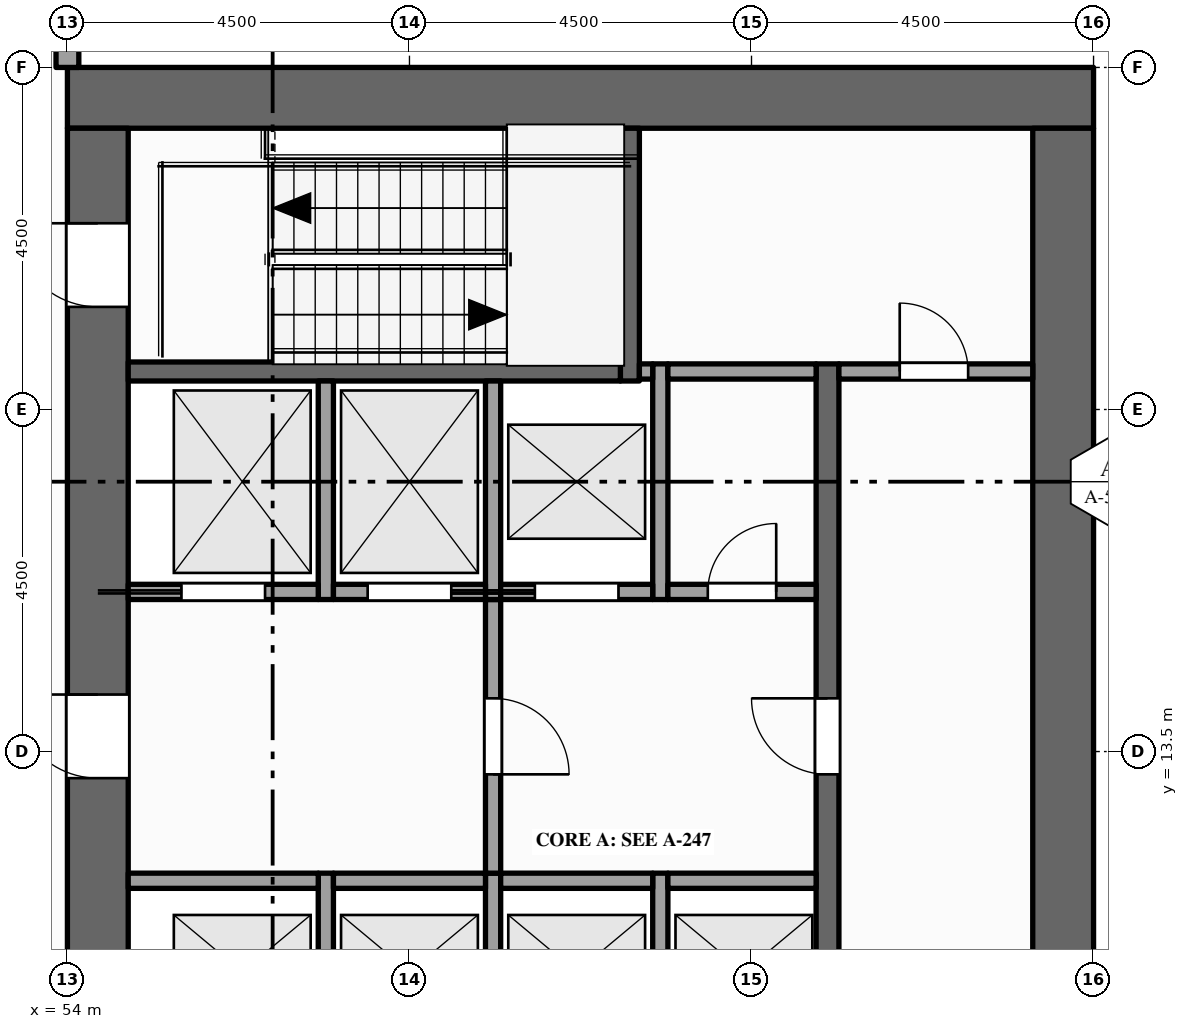
"""IFC4 building model, lengths in metres.
Left out: names, types, materials, properties, quantities, classifications, styles, units other than length and angle.
Written with IfcOpenShell. Run it as: python <this file> out.ifc"""

import sys

from ifc_helpers import new_model, si_unit, direction, frame, frame_2d, origin, place, context, subcontext, project, spatial, rectangle, extrude, element, fill, save


model = new_model("IFC4")
c1 = context("Model", 3, precision=1e-05, world=origin(), true_north=direction((0.0, 1.0)))
c2 = subcontext(c1, "Body", "Model", "MODEL_VIEW")
j1 = project(units=[si_unit("LENGTHUNIT", "METRE"), si_unit("PLANEANGLEUNIT", "RADIAN")], contexts=[c1])
p1 = place(None, origin())
s1 = spatial("IfcSite", under=j1, at=p1, CompositionType="ELEMENT")
p2 = place(p1, origin())
s2 = spatial("IfcBuilding", under=s1, at=p2, CompositionType="ELEMENT")
p3 = place(p2, frame((0.0, 0.0, 269.0)))
s3 = spatial("IfcBuildingStorey", under=s2, at=p3, CompositionType="ELEMENT", Elevation=269.0)
p4 = place(p3, frame((54.0, 22.1, -0.15), z_axis=(0.0, 0.0, 1.0), x_axis=(1.0, 0.0, 0.0)))
e1 = element("IfcWall", 1, at=p4, inside=s3, PredefinedType="SHEAR", context=c2, shape_type="SweptSolid", body=[
    extrude(rectangle(XDim=13.5, YDim=0.8, at=frame_2d((6.75, 0.0))), origin(), (0.0, 0.0, 1.0), 4.0),
])
p5 = place(p3, frame((54.4, 0.8, -0.15), z_axis=(0.0, 0.0, 1.0), x_axis=(0.0, 1.0, 0.0)))
e2 = element("IfcWall", 2, at=p5, inside=s3, PredefinedType="SHEAR", context=c2, shape_type="SweptSolid", body=[
    extrude(rectangle(XDim=20.9, YDim=0.8, at=frame_2d((10.45, 0.0))), origin(), (0.0, 0.0, 1.0), 4.0),
])
p6 = place(p5, frame((6.3, 0.0, 0.15)))
e3 = element("IfcOpeningElement", 3, at=p6, cuts=e2, PredefinedType="OPENING", context=c2, shape_type="SweptSolid", body=[
    extrude(rectangle(XDim=1.8, YDim=2.1, at=frame_2d((0.9, 1.05))), frame((0.0, 0.41, 0.0), z_axis=(0.0, -1.0, 0.0), x_axis=(1.0, 0.0, 0.0)), (0.0, 0.0, 1.0), 0.82),
])
p7 = place(p5, frame((12.35, 0.0, 0.15)))
e4 = element("IfcOpeningElement", 4, at=p7, cuts=e2, PredefinedType="OPENING", context=c2, shape_type="SweptSolid", body=[
    extrude(rectangle(XDim=1.1, YDim=2.1, at=frame_2d((0.55, 1.05))), frame((0.0, 0.41, 0.0), z_axis=(0.0, -1.0, 0.0), x_axis=(1.0, 0.0, 0.0)), (0.0, 0.0, 1.0), 0.82),
])
p8 = place(p5, frame((1.35, 0.0, 0.15)))
e5 = element("IfcOpeningElement", 5, at=p8, cuts=e2, PredefinedType="OPENING", context=c2, shape_type="SweptSolid", body=[
    extrude(rectangle(XDim=1.1, YDim=2.1, at=frame_2d((0.55, 1.05))), frame((0.0, 0.41, 0.0), z_axis=(0.0, -1.0, 0.0), x_axis=(1.0, 0.0, 0.0)), (0.0, 0.0, 1.0), 0.82),
])
p9 = place(p5, frame((18.55, 0.0, 0.15)))
e6 = element("IfcOpeningElement", 6, at=p9, cuts=e2, PredefinedType="OPENING", context=c2, shape_type="SweptSolid", body=[
    extrude(rectangle(XDim=1.1, YDim=2.1, at=frame_2d((0.55, 1.05))), frame((0.0, 0.41, 0.0), z_axis=(0.0, -1.0, 0.0), x_axis=(1.0, 0.0, 0.0)), (0.0, 0.0, 1.0), 0.82),
])
p10 = place(p3, frame((67.1, 0.8, -0.15), z_axis=(0.0, 0.0, 1.0), x_axis=(0.0, 1.0, 0.0)))
e7 = element("IfcWall", 7, at=p10, inside=s3, PredefinedType="SHEAR", context=c2, shape_type="SweptSolid", body=[
    extrude(rectangle(XDim=20.9, YDim=0.8, at=frame_2d((10.45, 0.0))), origin(), (0.0, 0.0, 1.0), 4.0),
])
p11 = place(p3, frame((54.0, 22.5, 0.0), z_axis=(0.0, 0.0, 1.0), x_axis=(0.0, 1.0, 0.0)))
e8 = element("IfcWall", 8, at=p11, inside=s3, PredefinedType="STANDARD", context=c2, shape_type="SweptSolid", body=[
    extrude(rectangle(XDim=1.175, YDim=0.3, at=frame_2d((0.587, 0.0))), origin(), (0.0, 0.0, 1.0), 3.162),
])
p12 = place(p3, frame((57.4, 9.3, 0.0), z_axis=(0.0, 0.0, 1.0), x_axis=(0.0, 1.0, 0.0)))
e9 = element("IfcWall", 9, at=p12, inside=s3, PredefinedType="SOLIDWALL", context=c2, shape_type="SweptSolid", body=[
    extrude(rectangle(XDim=2.6, YDim=0.2, at=frame_2d((1.3, 0.0))), origin(), (0.0, 0.0, 1.0), 3.85),
])
p13 = place(p3, frame((57.4, 15.5, 0.0), z_axis=(0.0, 0.0, 1.0), x_axis=(0.0, 1.0, 0.0)))
e10 = element("IfcWall", 10, at=p13, inside=s3, PredefinedType="SOLIDWALL", context=c2, shape_type="SweptSolid", body=[
    extrude(rectangle(XDim=2.875, YDim=0.2, at=frame_2d((1.438, 0.0))), origin(), (0.0, 0.0, 1.0), 3.85),
])
p14 = place(p3, frame((59.6, 9.3, 0.0), z_axis=(0.0, 0.0, 1.0), x_axis=(0.0, 1.0, 0.0)))
e11 = element("IfcWall", 11, at=p14, inside=s3, PredefinedType="SOLIDWALL", context=c2, shape_type="SweptSolid", body=[
    extrude(rectangle(XDim=2.6, YDim=0.2, at=frame_2d((1.3, 0.0))), origin(), (0.0, 0.0, 1.0), 3.85),
])
p15 = place(p3, frame((59.6, 11.9, 0.0), z_axis=(0.0, 0.0, 1.0), x_axis=(0.0, 1.0, 0.0)))
e12 = element("IfcWall", 12, at=p15, inside=s3, PredefinedType="PARTITIONING", context=c2, shape_type="SweptSolid", body=[
    extrude(rectangle(XDim=3.6, YDim=0.2, at=frame_2d((1.8, 0.0))), origin(), (0.0, 0.0, 1.0), 3.85),
])
p16 = place(p15, frame((1.3, 0.0, 0.0)))
e13 = element("IfcOpeningElement", 13, at=p16, cuts=e12, PredefinedType="OPENING", context=c2, shape_type="SweptSolid", body=[
    extrude(rectangle(XDim=1.0, YDim=2.1, at=frame_2d((0.5, 1.05))), frame((0.0, 0.11, 0.0), z_axis=(0.0, -1.0, 0.0), x_axis=(1.0, 0.0, 0.0)), (0.0, 0.0, 1.0), 0.22),
])
p17 = place(p3, frame((59.6, 15.5, 0.0), z_axis=(0.0, 0.0, 1.0), x_axis=(0.0, 1.0, 0.0)))
e14 = element("IfcWall", 14, at=p17, inside=s3, PredefinedType="SOLIDWALL", context=c2, shape_type="SweptSolid", body=[
    extrude(rectangle(XDim=2.875, YDim=0.2, at=frame_2d((1.438, 0.0))), origin(), (0.0, 0.0, 1.0), 3.85),
])
p18 = place(p3, frame((61.4, 18.375, 0.0), z_axis=(0.0, 0.0, 1.0), x_axis=(0.0, 1.0, 0.0)))
e15 = element("IfcWall", 15, at=p18, inside=s3, PredefinedType="SHEAR", context=c2, shape_type="SweptSolid", body=[
    extrude(rectangle(XDim=3.325, YDim=0.25, at=frame_2d((1.663, 0.0))), origin(), (0.0, 0.0, 1.0), 3.85),
])
p19 = place(p3, frame((61.8, 9.3, 0.0), z_axis=(0.0, 0.0, 1.0), x_axis=(0.0, 1.0, 0.0)))
e16 = element("IfcWall", 16, at=p19, inside=s3, PredefinedType="SOLIDWALL", context=c2, shape_type="SweptSolid", body=[
    extrude(rectangle(XDim=2.6, YDim=0.2, at=frame_2d((1.3, 0.0))), origin(), (0.0, 0.0, 1.0), 3.85),
])
p20 = place(p3, frame((61.8, 15.5, 0.0), z_axis=(0.0, 0.0, 1.0), x_axis=(0.0, 1.0, 0.0)))
e17 = element("IfcWall", 17, at=p20, inside=s3, PredefinedType="SOLIDWALL", context=c2, shape_type="SweptSolid", body=[
    extrude(rectangle(XDim=3.1, YDim=0.2, at=frame_2d((1.55, 0.0))), origin(), (0.0, 0.0, 1.0), 3.85),
])
p21 = place(p3, frame((64.0, 4.1, 0.0), z_axis=(0.0, 0.0, 1.0), x_axis=(0.0, 1.0, 0.0)))
e18 = element("IfcWall", 18, at=p21, inside=s3, PredefinedType="SHEAR", context=c2, shape_type="SweptSolid", body=[
    extrude(rectangle(XDim=14.5, YDim=0.3, at=frame_2d((7.25, 0.0))), origin(), (0.0, 0.0, 1.0), 3.85),
])
p22 = place(p21, frame((3.4, 0.0, 0.0)))
e19 = element("IfcOpeningElement", 19, at=p22, cuts=e18, PredefinedType="OPENING", context=c2, shape_type="SweptSolid", body=[
    extrude(rectangle(XDim=1.0, YDim=2.1, at=frame_2d((0.5, 1.05))), frame((0.0, 0.16, 0.0), z_axis=(0.0, -1.0, 0.0), x_axis=(1.0, 0.0, 0.0)), (0.0, 0.0, 1.0), 0.32),
])
p23 = place(p21, frame((9.1, 0.0, 0.0)))
e20 = element("IfcOpeningElement", 20, at=p23, cuts=e18, PredefinedType="OPENING", context=c2, shape_type="SweptSolid", body=[
    extrude(rectangle(XDim=1.0, YDim=2.1, at=frame_2d((0.5, 1.05))), frame((0.0, 0.16, 0.0), z_axis=(0.0, -1.0, 0.0), x_axis=(1.0, 0.0, 0.0)), (0.0, 0.0, 1.0), 0.32),
])
p24 = place(p3, frame((54.8, 11.8, 0.0), z_axis=(0.0, 0.0, 1.0), x_axis=(1.0, 0.0, 0.0)))
e21 = element("IfcWall", 21, at=p24, inside=s3, PredefinedType="SOLIDWALL", context=c2, shape_type="SweptSolid", body=[
    extrude(rectangle(XDim=2.5, YDim=0.2, at=frame_2d((1.25, 0.0))), origin(), (0.0, 0.0, 1.0), 3.85),
])
for number, where, z_axis, x_axis in (
    (22, (57.5, 11.8, 0.0), (0.0, 0.0, 1.0), (1.0, 0.0, 0.0)),
    (23, (59.7, 11.8, 0.0), (0.0, 0.0, 1.0), (1.0, 0.0, 0.0)),
):
    element("IfcWall", number, at=place(p3, frame(where, z_axis=z_axis, x_axis=x_axis)), inside=s3, PredefinedType="SOLIDWALL", context=c2, shape_type="SweptSolid", body=[
        extrude(rectangle(XDim=2.0, YDim=0.2, at=frame_2d((1.0, 0.0))), origin(), (0.0, 0.0, 1.0), 3.85),
    ])
p25 = place(p3, frame((61.9, 11.8, 0.0), z_axis=(0.0, 0.0, 1.0), x_axis=(1.0, 0.0, 0.0)))
e24 = element("IfcWall", 24, at=p25, inside=s3, PredefinedType="SOLIDWALL", context=c2, shape_type="SweptSolid", body=[
    extrude(rectangle(XDim=1.95, YDim=0.2, at=frame_2d((0.975, 0.0))), origin(), (0.0, 0.0, 1.0), 3.85),
])
p26 = place(p3, frame((54.8, 15.6, 0.0), z_axis=(0.0, 0.0, 1.0), x_axis=(1.0, 0.0, 0.0)))
e25 = element("IfcWall", 25, at=p26, inside=s3, PredefinedType="SOLIDWALL", context=c2, shape_type="SweptSolid", body=[
    extrude(rectangle(XDim=2.5, YDim=0.2, at=frame_2d((1.25, 0.0))), origin(), (0.0, 0.0, 1.0), 3.85),
])
p27 = place(p26, frame((0.7, 0.0, 0.012)))
e26 = element("IfcOpeningElement", 26, at=p27, cuts=e25, PredefinedType="OPENING", context=c2, shape_type="SweptSolid", body=[
    extrude(rectangle(XDim=1.1, YDim=2.1, at=frame_2d((0.55, 1.05))), frame((0.0, 0.11, 0.0), z_axis=(0.0, -1.0, 0.0), x_axis=(1.0, 0.0, 0.0)), (0.0, 0.0, 1.0), 0.22),
])
p28 = place(p3, frame((57.5, 15.6, 0.0), z_axis=(0.0, 0.0, 1.0), x_axis=(1.0, 0.0, 0.0)))
e27 = element("IfcWall", 27, at=p28, inside=s3, PredefinedType="SOLIDWALL", context=c2, shape_type="SweptSolid", body=[
    extrude(rectangle(XDim=2.0, YDim=0.2, at=frame_2d((1.0, 0.0))), origin(), (0.0, 0.0, 1.0), 3.85),
])
p29 = place(p28, frame((0.45, 0.0, 0.012)))
e28 = element("IfcOpeningElement", 28, at=p29, cuts=e27, PredefinedType="OPENING", context=c2, shape_type="SweptSolid", body=[
    extrude(rectangle(XDim=1.1, YDim=2.1, at=frame_2d((0.55, 1.05))), frame((0.0, 0.11, 0.0), z_axis=(0.0, -1.0, 0.0), x_axis=(1.0, 0.0, 0.0)), (0.0, 0.0, 1.0), 0.22),
])
p30 = place(p3, frame((59.7, 15.6, 0.0), z_axis=(0.0, 0.0, 1.0), x_axis=(1.0, 0.0, 0.0)))
e29 = element("IfcWall", 29, at=p30, inside=s3, PredefinedType="SOLIDWALL", context=c2, shape_type="SweptSolid", body=[
    extrude(rectangle(XDim=2.0, YDim=0.2, at=frame_2d((1.0, 0.0))), origin(), (0.0, 0.0, 1.0), 3.85),
])
p31 = place(p30, frame((0.45, 0.0, 0.012)))
e30 = element("IfcOpeningElement", 30, at=p31, cuts=e29, PredefinedType="OPENING", context=c2, shape_type="SweptSolid", body=[
    extrude(rectangle(XDim=1.1, YDim=2.1, at=frame_2d((0.55, 1.05))), frame((0.0, 0.11, 0.0), z_axis=(0.0, -1.0, 0.0), x_axis=(1.0, 0.0, 0.0)), (0.0, 0.0, 1.0), 0.22),
])
p32 = place(p3, frame((61.9, 15.6, 0.0), z_axis=(0.0, 0.0, 1.0), x_axis=(1.0, 0.0, 0.0)))
e31 = element("IfcWall", 31, at=p32, inside=s3, PredefinedType="PARTITIONING", context=c2, shape_type="SweptSolid", body=[
    extrude(rectangle(XDim=1.95, YDim=0.2, at=frame_2d((0.975, 0.0))), origin(), (0.0, 0.0, 1.0), 3.85),
])
p33 = place(p32, frame((0.525, 0.0, 0.0)))
e32 = element("IfcOpeningElement", 32, at=p33, cuts=e31, PredefinedType="OPENING", context=c2, shape_type="SweptSolid", body=[
    extrude(rectangle(XDim=0.9, YDim=2.1, at=frame_2d((0.45, 1.05))), frame((0.0, 0.11, 0.0), z_axis=(0.0, -1.0, 0.0), x_axis=(1.0, 0.0, 0.0)), (0.0, 0.0, 1.0), 0.22),
])
p34 = place(p3, frame((54.8, 18.5, 0.0), z_axis=(0.0, 0.0, 1.0), x_axis=(1.0, 0.0, 0.0)))
e33 = element("IfcWall", 33, at=p34, inside=s3, PredefinedType="SHEAR", context=c2, shape_type="SweptSolid", body=[
    extrude(rectangle(XDim=6.475, YDim=0.25, at=frame_2d((3.237, 0.0))), origin(), (0.0, 0.0, 1.0), 3.85),
])
p35 = place(p3, frame((61.525, 18.5, 0.0), z_axis=(0.0, 0.0, 1.0), x_axis=(1.0, 0.0, 0.0)))
e34 = element("IfcWall", 34, at=p35, inside=s3, PredefinedType="SOLIDWALL", context=c2, shape_type="SweptSolid", body=[
    extrude(rectangle(XDim=0.175, YDim=0.2, at=frame_2d((0.087, 0.0))), origin(), (0.0, 0.0, 1.0), 3.85),
])
p36 = place(p3, frame((61.9, 18.5, 0.0), z_axis=(0.0, 0.0, 1.0), x_axis=(1.0, 0.0, 0.0)))
e35 = element("IfcWall", 35, at=p36, inside=s3, PredefinedType="PARTITIONING", context=c2, shape_type="SweptSolid", body=[
    extrude(rectangle(XDim=1.95, YDim=0.2, at=frame_2d((0.975, 0.0))), origin(), (0.0, 0.0, 1.0), 3.85),
])
p37 = place(p3, frame((64.15, 18.5, 0.0), z_axis=(0.0, 0.0, 1.0), x_axis=(1.0, 0.0, 0.0)))
e36 = element("IfcWall", 36, at=p37, inside=s3, PredefinedType="PARTITIONING", context=c2, shape_type="SweptSolid", body=[
    extrude(rectangle(XDim=2.55, YDim=0.2, at=frame_2d((1.275, 0.0))), origin(), (0.0, 0.0, 1.0), 3.85),
])
p38 = place(p37, frame((0.8, 0.0, 0.0)))
e37 = element("IfcOpeningElement", 37, at=p38, cuts=e36, PredefinedType="OPENING", context=c2, shape_type="SweptSolid", body=[
    extrude(rectangle(XDim=0.9, YDim=2.1, at=frame_2d((0.45, 1.05))), frame((0.0, 0.11, 0.0), z_axis=(0.0, -1.0, 0.0), x_axis=(1.0, 0.0, 0.0)), (0.0, 0.0, 1.0), 0.22),
])
p39 = place(p27, origin())
e38 = element("IfcDoor", 38, at=p39, inside=s3, OperationType="SLIDING_TO_LEFT", PredefinedType="DOOR", context=c2, shape_type="SweptSolid", body=[
    extrude(rectangle(XDim=1.1, YDim=2.1, at=frame_2d((0.55, 1.05))), frame((0.0, 0.025, 0.0), z_axis=(0.0, -1.0, 0.0), x_axis=(1.0, 0.0, 0.0)), (0.0, 0.0, 1.0), 0.05),
])
fill(e26, e38)
p40 = place(p29, origin())
e39 = element("IfcDoor", 39, at=p40, inside=s3, OperationType="SLIDING_TO_RIGHT", PredefinedType="DOOR", context=c2, shape_type="SweptSolid", body=[
    extrude(rectangle(XDim=1.1, YDim=2.1, at=frame_2d((0.55, 1.05))), frame((0.0, 0.025, 0.0), z_axis=(0.0, -1.0, 0.0), x_axis=(1.0, 0.0, 0.0)), (0.0, 0.0, 1.0), 0.05),
])
fill(e28, e39)
p41 = place(p31, origin())
e40 = element("IfcDoor", 40, at=p41, inside=s3, OperationType="SLIDING_TO_LEFT", PredefinedType="DOOR", context=c2, shape_type="SweptSolid", body=[
    extrude(rectangle(XDim=1.1, YDim=2.1, at=frame_2d((0.55, 1.05))), frame((0.0, 0.025, 0.0), z_axis=(0.0, -1.0, 0.0), x_axis=(1.0, 0.0, 0.0)), (0.0, 0.0, 1.0), 0.05),
])
fill(e30, e40)
p42 = place(p7, origin())
e41 = element("IfcDoor", 41, at=p42, inside=s3, OperationType="SINGLE_SWING_RIGHT", PredefinedType="DOOR", context=c2, shape_type="SweptSolid", body=[
    extrude(rectangle(XDim=1.1, YDim=2.1, at=frame_2d((0.55, 1.05))), frame((0.0, 0.025, 0.0), z_axis=(0.0, -1.0, 0.0), x_axis=(1.0, 0.0, 0.0)), (0.0, 0.0, 1.0), 0.05),
])
fill(e4, e41)
p43 = place(p16, origin())
e42 = element("IfcDoor", 42, at=p43, inside=s3, OperationType="SINGLE_SWING_LEFT", PredefinedType="DOOR", context=c2, shape_type="SweptSolid", body=[
    extrude(rectangle(XDim=1.0, YDim=2.1, at=frame_2d((0.5, 1.05))), frame((0.0, 0.025, 0.0), z_axis=(0.0, -1.0, 0.0), x_axis=(1.0, 0.0, 0.0)), (0.0, 0.0, 1.0), 0.05),
])
fill(e13, e42)
p44 = place(p23, origin())
e43 = element("IfcDoor", 43, at=p44, inside=s3, OperationType="SINGLE_SWING_RIGHT", PredefinedType="DOOR", context=c2, shape_type="SweptSolid", body=[
    extrude(rectangle(XDim=1.0, YDim=2.1, at=frame_2d((0.5, 1.05))), frame((0.0, 0.025, 0.0), z_axis=(0.0, -1.0, 0.0), x_axis=(1.0, 0.0, 0.0)), (0.0, 0.0, 1.0), 0.05),
])
fill(e20, e43)
p45 = place(p9, origin())
e44 = element("IfcDoor", 44, at=p45, inside=s3, OperationType="SINGLE_SWING_RIGHT", PredefinedType="DOOR", context=c2, shape_type="SweptSolid", body=[
    extrude(rectangle(XDim=1.1, YDim=2.1, at=frame_2d((0.55, 1.05))), frame((0.0, 0.025, 0.0), z_axis=(0.0, -1.0, 0.0), x_axis=(1.0, 0.0, 0.0)), (0.0, 0.0, 1.0), 0.05),
])
fill(e6, e44)
p46 = place(p38, origin())
e45 = element("IfcDoor", 45, at=p46, inside=s3, OperationType="SINGLE_SWING_LEFT", PredefinedType="DOOR", context=c2, shape_type="SweptSolid", body=[
    extrude(rectangle(XDim=0.9, YDim=2.1, at=frame_2d((0.45, 1.05))), frame((0.0, 0.025, 0.0), z_axis=(0.0, -1.0, 0.0), x_axis=(1.0, 0.0, 0.0)), (0.0, 0.0, 1.0), 0.05),
])
fill(e37, e45)
p47 = place(p33, origin())
e46 = element("IfcDoor", 46, at=p47, inside=s3, OperationType="SINGLE_SWING_RIGHT", PredefinedType="DOOR", context=c2, shape_type="SweptSolid", body=[
    extrude(rectangle(XDim=0.9, YDim=2.1, at=frame_2d((0.45, 1.05))), frame((0.0, 0.025, 0.0), z_axis=(0.0, -1.0, 0.0), x_axis=(1.0, 0.0, 0.0)), (0.0, 0.0, 1.0), 0.05),
])
fill(e32, e46)
save(model, sys.argv[1])
